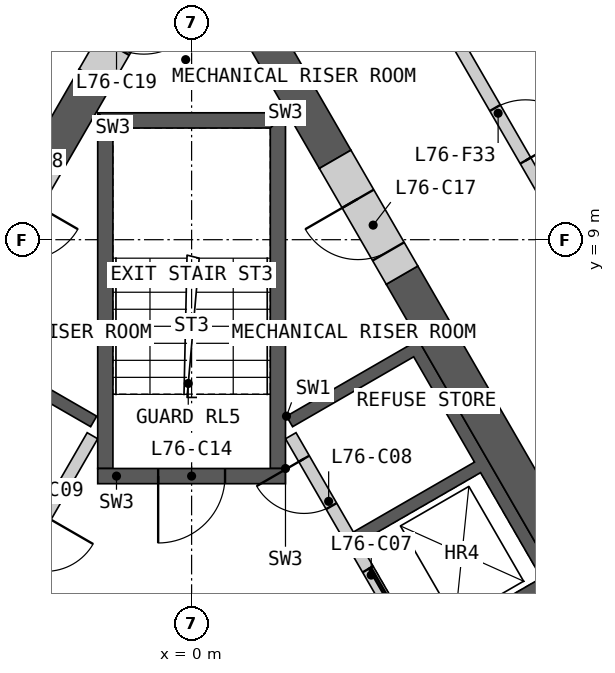
"""IFC4 building model, lengths in metres.
Left out: names, types, materials, properties, quantities, classifications, styles, units other than length and angle.
Written with IfcOpenShell. Run it as: python <this file> out.ifc"""

import sys

from ifc_helpers import new_model, si_unit, direction, frame, frame_2d, origin, place, context, subcontext, project, spatial, polyline, rectangle, outline, extrude, element, fill, save


model = new_model("IFC4")
c1 = context("Model", 3, precision=1e-05, world=origin(), true_north=direction((0.0, 1.0)))
c2 = subcontext(c1, "Body", "Model", "MODEL_VIEW")
j1 = project(units=[si_unit("LENGTHUNIT", "METRE"), si_unit("PLANEANGLEUNIT", "RADIAN")], contexts=[c1])
p1 = place(None, origin())
s1 = spatial("IfcSite", under=j1, at=p1, CompositionType="ELEMENT")
p2 = place(p1, origin())
s2 = spatial("IfcBuilding", under=s1, at=p2, CompositionType="ELEMENT")
p3 = place(p2, frame((0.0, 0.0, 339.2)))
s3 = spatial("IfcBuildingStorey", under=s2, at=p3, CompositionType="ELEMENT", Elevation=339.2)
p4 = place(p3, origin())
e1 = element("IfcWall", 1, at=p4, inside=s3, PredefinedType="SHEAR", context=c2, shape_type="SweptSolid", body=[
    extrude(outline(polyline([(1.561, 6.097), (3.731, 7.35), (8.231, -0.444), (6.061, -1.697), (5.96, -1.524), (7.952, -0.374), (6.952, 1.358), (4.96, 0.208), (4.861, 0.381), (6.852, 1.531), (5.852, 3.263), (3.861, 2.113), (3.76, 2.287), (5.752, 3.437), (4.752, 5.169), (2.76, 4.019), (2.66, 4.192), (4.652, 5.342), (3.652, 7.074), (1.66, 5.924), (1.561, 6.097)])), origin(), (0.0, 0.0, 1.0), 3.1),
])
p5 = place(p3, frame((5.817, -1.476, 0.0), z_axis=(0.0, 0.0, 1.0), x_axis=(-0.500002616675, 0.866023893041, 0.0)))
e2 = element("IfcWall", 2, at=p5, inside=s3, PredefinedType="SOLIDWALL", context=c2, shape_type="SweptSolid", body=[
    extrude(rectangle(XDim=8.373, YDim=0.2, at=frame_2d((4.187, 0.0))), origin(), (0.0, 0.0, 1.0), 3.1),
])
p6 = place(p5, frame((0.337, 0.0, 0.0)))
e3 = element("IfcOpeningElement", 3, at=p6, cuts=e2, PredefinedType="OPENING", context=c2, shape_type="SweptSolid", body=[
    extrude(rectangle(XDim=1.1, YDim=2.1, at=frame_2d((0.55, 1.05))), frame((0.0, 0.11, 0.0), z_axis=(0.0, -1.0, 0.0), x_axis=(1.0, 0.0, 0.0)), (0.0, 0.0, 1.0), 0.22),
])
p7 = place(p5, frame((2.537, 0.0, 0.0)))
e4 = element("IfcOpeningElement", 4, at=p7, cuts=e2, PredefinedType="OPENING", context=c2, shape_type="SweptSolid", body=[
    extrude(rectangle(XDim=1.1, YDim=2.1, at=frame_2d((0.55, 1.05))), frame((0.0, 0.11, 0.0), z_axis=(0.0, -1.0, 0.0), x_axis=(1.0, 0.0, 0.0)), (0.0, 0.0, 1.0), 0.22),
])
p8 = place(p5, frame((4.737, 0.0, 0.0)))
e5 = element("IfcOpeningElement", 5, at=p8, cuts=e2, PredefinedType="OPENING", context=c2, shape_type="SweptSolid", body=[
    extrude(rectangle(XDim=1.1, YDim=2.1, at=frame_2d((0.55, 1.05))), frame((0.0, 0.11, 0.0), z_axis=(0.0, -1.0, 0.0), x_axis=(1.0, 0.0, 0.0)), (0.0, 0.0, 1.0), 0.22),
])
p9 = place(p5, frame((7.037, 0.0, 0.0)))
e6 = element("IfcOpeningElement", 6, at=p9, cuts=e2, PredefinedType="OPENING", context=c2, shape_type="SweptSolid", body=[
    extrude(rectangle(XDim=0.9, YDim=2.1, at=frame_2d((0.45, 1.05))), frame((0.0, 0.11, 0.0), z_axis=(0.0, -1.0, 0.0), x_axis=(1.0, 0.0, 0.0)), (0.0, 0.0, 1.0), 0.22),
])
p10 = place(p3, origin())
e7 = element("IfcWall", 7, at=p10, inside=s3, PredefinedType="SHEAR", context=c2, shape_type="SweptSolid", body=[
    extrude(outline(polyline([(-4.96, 0.208), (-7.131, 1.461), (-3.731, 7.35), (-1.561, 6.097), (-1.66, 5.924), (-3.652, 7.074), (-5.752, 3.437), (-3.76, 2.287), (-3.861, 2.113), (-5.852, 3.263), (-6.852, 1.531), (-4.861, 0.381), (-4.96, 0.208)])), origin(), (0.0, 0.0, 1.0), 3.1),
])
p11 = place(p3, frame((-1.631, 5.776, 0.0), z_axis=(0.0, 0.0, 1.0), x_axis=(-0.499992876559, -0.866029516466, 0.0)))
e8 = element("IfcWall", 8, at=p11, inside=s3, PredefinedType="SOLIDWALL", context=c2, shape_type="SweptSolid", body=[
    extrude(rectangle(XDim=6.486, YDim=0.2, at=frame_2d((3.243, 0.0))), origin(), (0.0, 0.0, 1.0), 3.1),
])
p12 = place(p11, frame((1.537, 0.0, 0.0)))
e9 = element("IfcOpeningElement", 9, at=p12, cuts=e8, PredefinedType="OPENING", context=c2, shape_type="SweptSolid", body=[
    extrude(rectangle(XDim=0.9, YDim=2.1, at=frame_2d((0.45, 1.05))), frame((0.0, 0.11, 0.0), z_axis=(0.0, -1.0, 0.0), x_axis=(1.0, 0.0, 0.0)), (0.0, 0.0, 1.0), 0.22),
])
p13 = place(p11, frame((4.837, 0.0, 0.0)))
e10 = element("IfcOpeningElement", 10, at=p13, cuts=e8, PredefinedType="OPENING", context=c2, shape_type="SweptSolid", body=[
    extrude(rectangle(XDim=0.9, YDim=2.1, at=frame_2d((0.45, 1.05))), frame((0.0, 0.11, 0.0), z_axis=(0.0, -1.0, 0.0), x_axis=(1.0, 0.0, 0.0)), (0.0, 0.0, 1.0), 0.22),
])
p14 = place(p3, origin())
e11 = element("IfcWall", 11, at=p14, inside=s3, PredefinedType="SHEAR", context=c2, shape_type="SweptSolid", body=[
    extrude(outline(polyline([(1.544, 5.237), (1.544, 11.087), (1.294, 10.837), (1.294, 5.237), (1.544, 5.237)])), origin(), (0.0, 0.0, 1.0), 3.1),
])
p15 = place(p3, origin())
e12 = element("IfcWall", 12, at=p15, inside=s3, PredefinedType="SHEAR", context=c2, shape_type="SweptSolid", body=[
    extrude(outline(polyline([(1.544, 11.087), (-1.544, 11.087), (-1.294, 10.837), (1.294, 10.837), (1.544, 11.087)])), origin(), (0.0, 0.0, 1.0), 3.1),
])
p16 = place(p3, origin())
e13 = element("IfcWall", 13, at=p16, inside=s3, PredefinedType="SHEAR", context=c2, shape_type="SweptSolid", body=[
    extrude(outline(polyline([(-1.294, 10.837), (-1.544, 11.087), (-1.544, 5.237), (-1.294, 5.237), (-1.294, 10.837)])), origin(), (0.0, 0.0, 1.0), 3.1),
])
p17 = place(p3, frame((1.544, 5.112, 0.0), z_axis=(0.0, 0.0, 1.0), x_axis=(-1.0, 0.0, 0.0)))
e14 = element("IfcWall", 14, at=p17, inside=s3, PredefinedType="SHEAR", context=c2, shape_type="SweptSolid", body=[
    extrude(rectangle(XDim=3.088, YDim=0.25, at=frame_2d((1.544, 0.0))), origin(), (0.0, 0.0, 1.0), 3.1),
])
p18 = place(p17, frame((0.994, 0.0, 0.0)))
e15 = element("IfcOpeningElement", 15, at=p18, cuts=e14, PredefinedType="OPENING", context=c2, shape_type="SweptSolid", body=[
    extrude(rectangle(XDim=1.1, YDim=2.1, at=frame_2d((0.55, 1.05))), frame((0.0, 0.135, 0.0), z_axis=(0.0, -1.0, 0.0), x_axis=(1.0, 0.0, 0.0)), (0.0, 0.0, 1.0), 0.27),
])
p19 = place(p3, frame((8.686, -0.634, 0.0), z_axis=(0.0, 0.0, 1.0), x_axis=(-0.50001836461, 0.866014800712, 0.0)))
e16 = element("IfcWall", 16, at=p19, inside=s3, PredefinedType="SHEAR", context=c2, shape_type="SweptSolid", body=[
    extrude(rectangle(XDim=10.451, YDim=0.6, at=frame_2d((5.225, 0.0))), origin(), (0.0, 0.0, 1.0), 3.1),
])
p20 = place(p3, frame((2.361, 10.322, 0.0), z_axis=(0.0, 0.0, 1.0), x_axis=(-0.500000735859, 0.866024978935, 0.0)))
e17 = element("IfcWall", 17, at=p20, inside=s3, PredefinedType="SHEAR", context=c2, shape_type="SweptSolid", body=[
    extrude(rectangle(XDim=4.202, YDim=0.6, at=frame_2d((2.101, 0.0))), origin(), (0.0, 0.0, 1.0), 3.1),
])
p21 = place(p3, frame((-1.59, 11.658, 0.0), z_axis=(0.0, 0.0, 1.0), x_axis=(-0.500037594623, -0.866003697431, 0.0)))
e18 = element("IfcWall", 18, at=p21, inside=s3, PredefinedType="SHEAR", context=c2, shape_type="SweptSolid", body=[
    extrude(rectangle(XDim=1.542, YDim=0.6, at=frame_2d((0.771, 0.0))), origin(), (0.0, 0.0, 1.0), 3.1),
])
p22 = place(p3, frame((3.461, 8.417, 0.0), z_axis=(0.0, 0.0, 1.0), x_axis=(-0.499946605688, 0.86605622881, 0.0)))
e19 = element("IfcWall", 19, at=p22, inside=s3, PredefinedType="SHEAR", context=c2, shape_type="SweptSolid", body=[
    extrude(rectangle(XDim=2.2, YDim=0.6, at=frame_2d((1.1, 0.0))), origin(), (0.0, 0.0, 1.0), 3.1),
])
p23 = place(p22, frame((0.45, 0.0, 0.0)))
e20 = element("IfcOpeningElement", 20, at=p23, cuts=e19, PredefinedType="OPENING", context=c2, shape_type="SweptSolid", body=[
    extrude(rectangle(XDim=1.0, YDim=2.1, at=frame_2d((0.5, 1.05))), frame((0.0, 0.31, 0.0), z_axis=(0.0, -1.0, 0.0), x_axis=(1.0, 0.0, 0.0)), (0.0, 0.0, 1.0), 0.62),
])
p24 = place(p3, frame((-2.361, 10.322, 0.0), z_axis=(0.0, 0.0, 1.0), x_axis=(-0.499946605688, -0.86605622881, 0.0)))
e21 = element("IfcWall", 21, at=p24, inside=s3, PredefinedType="SHEAR", context=c2, shape_type="SweptSolid", body=[
    extrude(rectangle(XDim=2.2, YDim=0.6, at=frame_2d((1.1, 0.0))), origin(), (0.0, 0.0, 1.0), 3.1),
])
p25 = place(p24, frame((0.75, 0.0, 0.0)))
e22 = element("IfcOpeningElement", 22, at=p25, cuts=e21, PredefinedType="OPENING", context=c2, shape_type="SweptSolid", body=[
    extrude(rectangle(XDim=1.0, YDim=2.1, at=frame_2d((0.5, 1.05))), frame((0.0, 0.31, 0.0), z_axis=(0.0, -1.0, 0.0), x_axis=(1.0, 0.0, 0.0)), (0.0, 0.0, 1.0), 0.62),
])
p26 = place(p3, frame((-0.26, 13.961, 0.0), z_axis=(0.0, 0.0, 1.0), x_axis=(-0.49997936161, -0.866037319036, 0.0)))
e23 = element("IfcWall", 23, at=p26, inside=s3, PredefinedType="SHEAR", context=c2, shape_type="SweptSolid", body=[
    extrude(rectangle(XDim=2.66, YDim=0.6, at=frame_2d((1.33, 0.0))), origin(), (0.0, 0.0, 1.0), 3.1),
])
p27 = place(p26, frame((1.05, 0.0, 0.0)))
e24 = element("IfcOpeningElement", 24, at=p27, cuts=e23, PredefinedType="OPENING", context=c2, shape_type="SweptSolid", body=[
    extrude(rectangle(XDim=1.0, YDim=2.1, at=frame_2d((0.5, 1.05))), frame((0.0, 0.31, 0.0), z_axis=(0.0, -1.0, 0.0), x_axis=(1.0, 0.0, 0.0)), (0.0, 0.0, 1.0), 0.62),
])
p28 = place(p3, frame((4.409, 12.174, 0.0), z_axis=(0.0, 0.0, 1.0), x_axis=(0.499984266882, -0.866034487114, 0.0)))
e25 = element("IfcWall", 25, at=p28, inside=s3, PredefinedType="PARTITIONING", context=c2, shape_type="SweptSolid", body=[
    extrude(rectangle(XDim=8.099, YDim=0.2, at=frame_2d((4.049, 0.0))), origin(), (0.0, 0.0, 1.0), 3.1),
])
p29 = place(p28, frame((5.123, 0.0, 0.0)))
e26 = element("IfcOpeningElement", 26, at=p29, cuts=e25, PredefinedType="OPENING", context=c2, shape_type="SweptSolid", body=[
    extrude(rectangle(XDim=1.0, YDim=2.1, at=frame_2d((0.5, 1.05))), frame((0.0, 0.11, 0.0), z_axis=(0.0, -1.0, 0.0), x_axis=(1.0, 0.0, 0.0)), (0.0, 0.0, 1.0), 0.22),
])
p30 = place(p28, frame((1.164, 0.0, 0.0)))
e27 = element("IfcOpeningElement", 27, at=p30, cuts=e25, PredefinedType="OPENING", context=c2, shape_type="SweptSolid", body=[
    extrude(rectangle(XDim=1.0, YDim=2.1, at=frame_2d((0.5, 1.05))), frame((0.0, 0.11, 0.0), z_axis=(0.0, -1.0, 0.0), x_axis=(1.0, 0.0, 0.0)), (0.0, 0.0, 1.0), 0.22),
])
p31 = place(p8, origin())
e28 = element("IfcDoor", 28, at=p31, inside=s3, OperationType="SLIDING_TO_LEFT", PredefinedType="DOOR", context=c2, shape_type="SweptSolid", body=[
    extrude(rectangle(XDim=1.1, YDim=2.1, at=frame_2d((0.55, 1.05))), frame((0.0, 0.025, 0.0), z_axis=(0.0, -1.0, 0.0), x_axis=(1.0, 0.0, 0.0)), (0.0, 0.0, 1.0), 0.05),
])
fill(e5, e28)
p32 = place(p9, origin())
e29 = element("IfcDoor", 29, at=p32, inside=s3, OperationType="SINGLE_SWING_RIGHT", PredefinedType="DOOR", context=c2, shape_type="SweptSolid", body=[
    extrude(rectangle(XDim=0.9, YDim=2.1, at=frame_2d((0.45, 1.05))), frame((0.0, 0.025, 0.0), z_axis=(0.0, -1.0, 0.0), x_axis=(1.0, 0.0, 0.0)), (0.0, 0.0, 1.0), 0.05),
])
fill(e6, e29)
p33 = place(p18, origin())
e30 = element("IfcDoor", 30, at=p33, inside=s3, OperationType="SINGLE_SWING_RIGHT", PredefinedType="DOOR", context=c2, shape_type="SweptSolid", body=[
    extrude(rectangle(XDim=1.1, YDim=2.1, at=frame_2d((0.55, 1.05))), frame((0.0, 0.025, 0.0), z_axis=(0.0, -1.0, 0.0), x_axis=(1.0, 0.0, 0.0)), (0.0, 0.0, 1.0), 0.05),
])
fill(e15, e30)
p34 = place(p23, origin())
e31 = element("IfcDoor", 31, at=p34, inside=s3, OperationType="SINGLE_SWING_RIGHT", PredefinedType="DOOR", context=c2, shape_type="SweptSolid", body=[
    extrude(rectangle(XDim=1.0, YDim=2.1, at=frame_2d((0.5, 1.05))), frame((0.0, 0.055, 0.0), z_axis=(0.0, -1.0, 0.0), x_axis=(1.0, 0.0, 0.0)), (0.0, 0.0, 1.0), 0.05),
])
fill(e20, e31)
p35 = place(p30, origin())
e32 = element("IfcDoor", 32, at=p35, inside=s3, OperationType="SINGLE_SWING_RIGHT", PredefinedType="DOOR", context=c2, shape_type="SweptSolid", body=[
    extrude(rectangle(XDim=1.0, YDim=2.1, at=frame_2d((0.5, 1.05))), frame((0.0, 0.025, 0.0), z_axis=(0.0, -1.0, 0.0), x_axis=(1.0, 0.0, 0.0)), (0.0, 0.0, 1.0), 0.05),
])
fill(e27, e32)
save(model, sys.argv[1])
